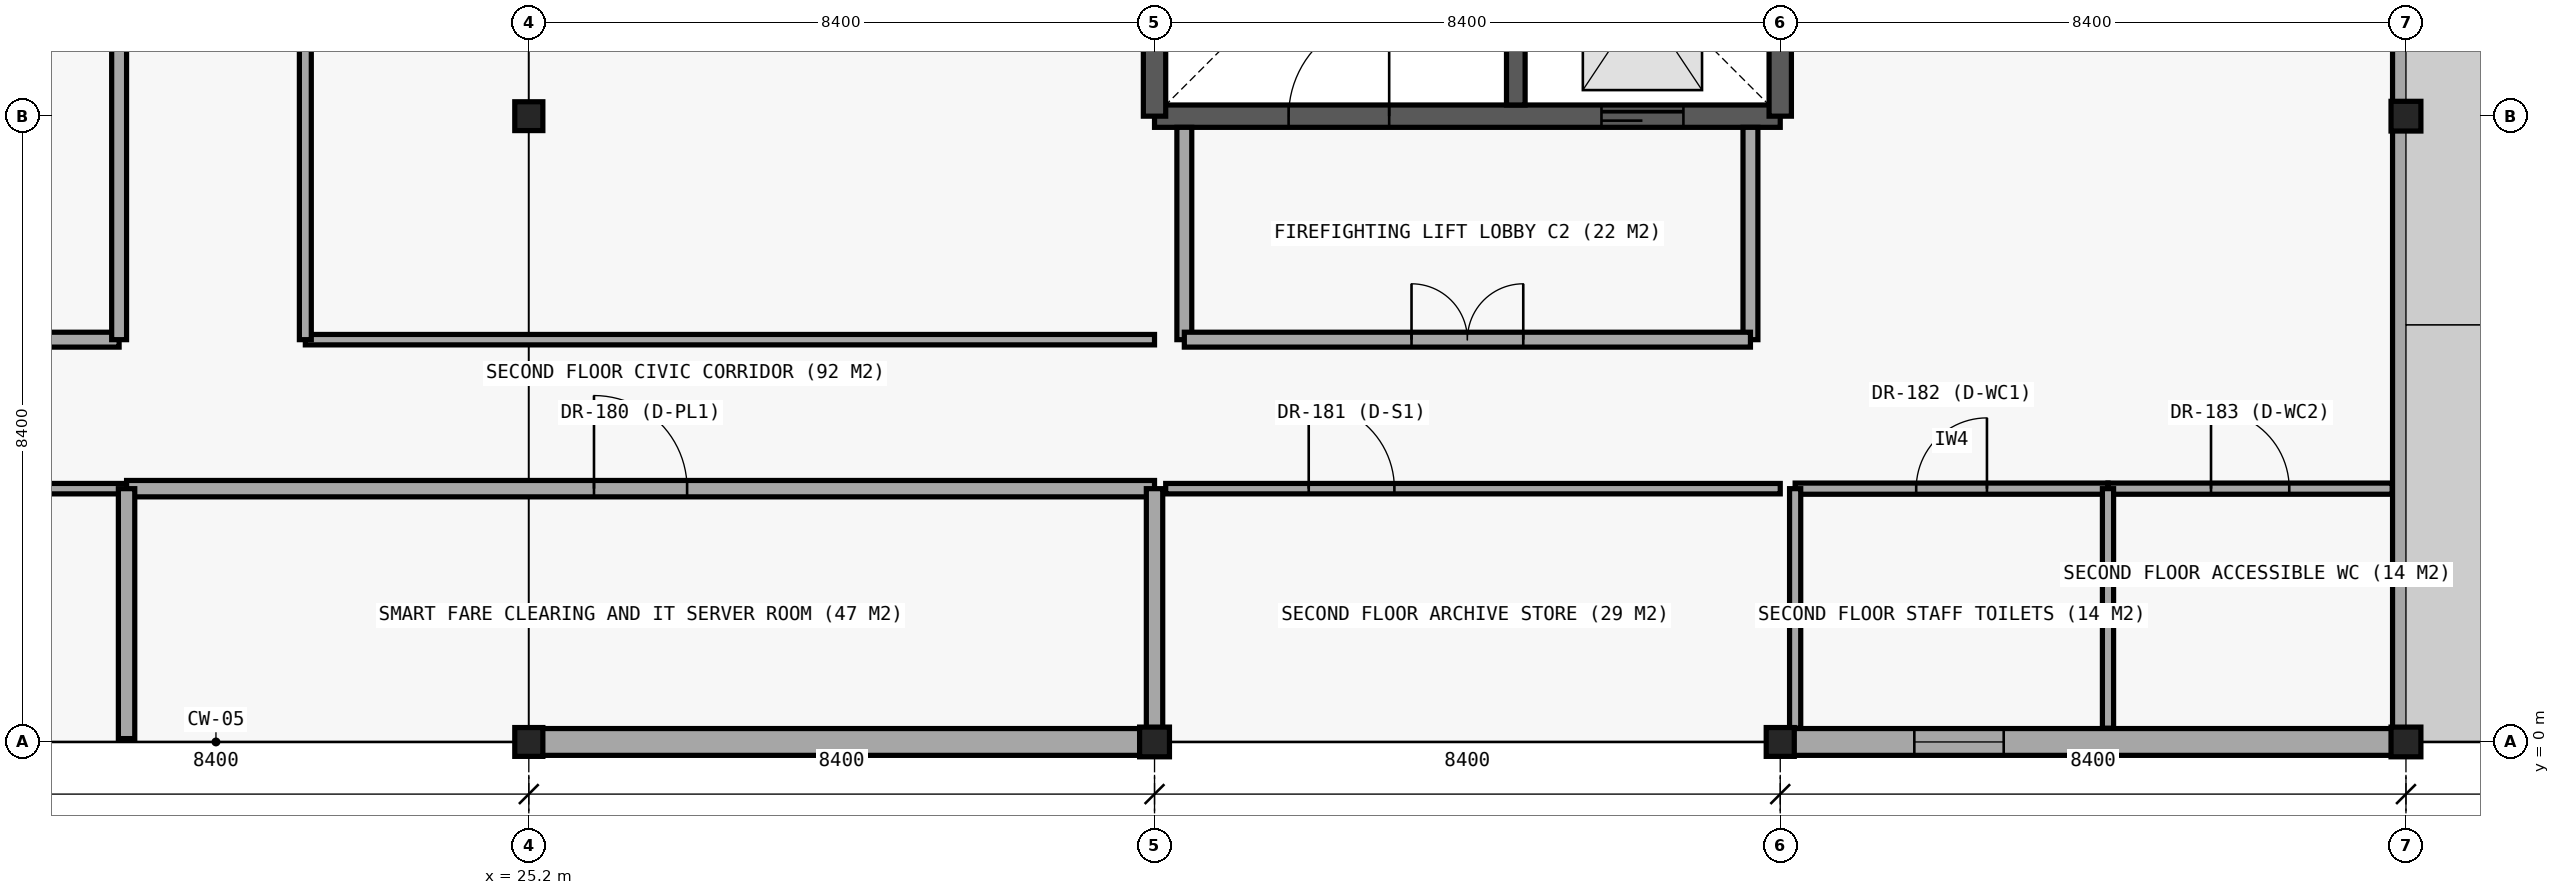
"""IFC4 building model, lengths in metres.
Left out: names, types, materials, properties, quantities, classifications, styles, units other than length and angle.
Written with IfcOpenShell. Run it as: python <this file> out.ifc"""

import sys

from ifc_helpers import new_model, si_unit, direction, frame, frame_2d, origin, origin_2d, place, context, subcontext, project, spatial, rectangle, i_section, extrude, element, fill, save


model = new_model("IFC4")
c1 = context("Model", 3, precision=1e-05, world=origin(), true_north=direction((0.0, 1.0)))
c2 = subcontext(c1, "Body", "Model", "MODEL_VIEW")
j1 = project(units=[si_unit("LENGTHUNIT", "METRE"), si_unit("PLANEANGLEUNIT", "RADIAN")], contexts=[c1])
p1 = place(None, origin())
s1 = spatial("IfcSite", under=j1, at=p1, CompositionType="ELEMENT")
p2 = place(p1, origin())
s2 = spatial("IfcBuilding", under=s1, at=p2, CompositionType="ELEMENT")
p3 = place(p2, frame((0.0, 0.0, 9.0)))
s3 = spatial("IfcBuildingStorey", under=s2, at=p3, CompositionType="ELEMENT", Elevation=9.0)
p4 = place(p3, frame((33.6, 8.4, 0.0), z_axis=(0.0, 0.0, 1.0), x_axis=(1.0, 0.0, 0.0)))
e1 = element("IfcWall", 1, at=p4, inside=s3, PredefinedType="SHEAR", context=c2, shape_type="SweptSolid", body=[
    extrude(rectangle(XDim=8.4, YDim=0.3, at=frame_2d((4.2, 0.0))), origin(), (0.0, 0.0, 1.0), 4.2),
])
p5 = place(p4, frame((1.8, 0.0, 0.0)))
e2 = element("IfcOpeningElement", 2, at=p5, cuts=e1, PredefinedType="OPENING", context=c2, shape_type="SweptSolid", body=[
    extrude(rectangle(XDim=1.35, YDim=2.2, at=frame_2d((0.675, 1.1))), frame((0.0, 0.16, 0.0), z_axis=(0.0, -1.0, 0.0), x_axis=(1.0, 0.0, 0.0)), (0.0, 0.0, 1.0), 0.32),
])
p6 = place(p4, frame((6.0, 0.0, 0.0)))
e3 = element("IfcOpeningElement", 3, at=p6, cuts=e1, PredefinedType="OPENING", context=c2, shape_type="SweptSolid", body=[
    extrude(rectangle(XDim=1.1, YDim=2.2, at=frame_2d((0.55, 1.1))), frame((0.0, 0.16, 0.0), z_axis=(0.0, -1.0, 0.0), x_axis=(1.0, 0.0, 0.0)), (0.0, 0.0, 1.0), 0.32),
])
for number, where, z_axis, x_axis in (
    (4, (42.0, 8.4, 0.0), (0.0, 0.0, 1.0), (0.0, 1.0, 0.0)),
    (5, (33.6, 16.8, 0.0), (0.0, 0.0, 1.0), (0.0, -1.0, 0.0)),
):
    element("IfcWall", number, at=place(p3, frame(where, z_axis=z_axis, x_axis=x_axis)), inside=s3, PredefinedType="SHEAR", context=c2, shape_type="SweptSolid", body=[
        extrude(rectangle(XDim=8.4, YDim=0.3, at=frame_2d((4.2, 0.0))), origin(), (0.0, 0.0, 1.0), 4.2),
    ])
p7 = place(p3, frame((38.45, 8.55, 0.0), z_axis=(0.0, 0.0, 1.0), x_axis=(0.0, 1.0, 0.0)))
e6 = element("IfcWall", 6, at=p7, inside=s3, PredefinedType="SHEAR", context=c2, shape_type="SweptSolid", body=[
    extrude(rectangle(XDim=8.1, YDim=0.25, at=frame_2d((4.05, 0.0))), origin(), (0.0, 0.0, 1.0), 4.2),
])
for number, where, z_axis, x_axis in (
    (7, (25.2, 0.0, 0.0), (0.0, 0.0, 1.0), (1.0, 0.0, 0.0)),
    (8, (25.2, 8.4, 0.0), (0.0, 0.0, 1.0), (1.0, 0.0, 0.0)),
):
    element("IfcColumn", number, at=place(p3, frame(where, z_axis=z_axis, x_axis=x_axis)), inside=s3, PredefinedType="COLUMN", context=c2, shape_type="SweptSolid", body=[
        extrude(i_section(OverallWidth=0.377, OverallDepth=0.387, WebThickness=0.022, FlangeThickness=0.036, FilletRadius=0.015, at=origin_2d()), origin(), (0.0, 0.0, 1.0), 4.2),
    ])
p8 = place(p3, frame((33.6, 0.0, 0.0), z_axis=(0.0, 0.0, 1.0), x_axis=(1.0, 0.0, 0.0)))
e9 = element("IfcColumn", 9, at=p8, inside=s3, PredefinedType="COLUMN", context=c2, shape_type="SweptSolid", body=[
    extrude(i_section(OverallWidth=0.401, OverallDepth=0.399, WebThickness=0.025, FlangeThickness=0.04, FilletRadius=0.015, at=origin_2d()), origin(), (0.0, 0.0, 1.0), 4.2),
])
p9 = place(p3, frame((42.0, 0.0, 0.0), z_axis=(0.0, 0.0, 1.0), x_axis=(1.0, 0.0, 0.0)))
e10 = element("IfcColumn", 10, at=p9, inside=s3, PredefinedType="COLUMN", context=c2, shape_type="SweptSolid", body=[
    extrude(i_section(OverallWidth=0.377, OverallDepth=0.387, WebThickness=0.022, FlangeThickness=0.036, FilletRadius=0.015, at=origin_2d()), origin(), (0.0, 0.0, 1.0), 4.2),
])
for number, where, z_axis, x_axis in (
    (11, (50.4, 0.0, 0.0), (0.0, 0.0, 1.0), (1.0, 0.0, 0.0)),
    (12, (50.4, 8.4, 0.0), (0.0, 0.0, 1.0), (1.0, 0.0, 0.0)),
):
    element("IfcColumn", number, at=place(p3, frame(where, z_axis=z_axis, x_axis=x_axis)), inside=s3, PredefinedType="COLUMN", context=c2, shape_type="SweptSolid", body=[
        extrude(i_section(OverallWidth=0.401, OverallDepth=0.399, WebThickness=0.025, FlangeThickness=0.04, FilletRadius=0.015, at=origin_2d()), origin(), (0.0, 0.0, 1.0), 4.2),
    ])
p10 = place(p3, frame((25.2, 0.0, 0.0), z_axis=(0.0, 0.0, 1.0), x_axis=(1.0, 0.0, 0.0)))
e13 = element("IfcWall", 13, at=p10, inside=s3, PredefinedType="STANDARD", context=c2, shape_type="SweptSolid", body=[
    extrude(rectangle(XDim=8.4, YDim=0.36, at=frame_2d((4.2, 0.0))), origin(), (0.0, 0.0, 1.0), 3.62),
])
p11 = place(p3, frame((42.0, 0.0, 0.0), z_axis=(0.0, 0.0, 1.0), x_axis=(1.0, 0.0, 0.0)))
e14 = element("IfcWall", 14, at=p11, inside=s3, PredefinedType="STANDARD", context=c2, shape_type="SweptSolid", body=[
    extrude(rectangle(XDim=8.4, YDim=0.36, at=frame_2d((4.2, 0.0))), origin(), (0.0, 0.0, 1.0), 3.62),
])
p12 = place(p11, frame((1.8, 0.0, 0.85)))
e15 = element("IfcOpeningElement", 15, at=p12, cuts=e14, PredefinedType="OPENING", context=c2, shape_type="SweptSolid", body=[
    extrude(rectangle(XDim=1.2, YDim=2.4, at=frame_2d((0.6, 1.2))), frame((0.0, 0.19, 0.0), z_axis=(0.0, -1.0, 0.0), x_axis=(1.0, 0.0, 0.0)), (0.0, 0.0, 1.0), 0.38),
])
p13 = place(p3, frame((50.4, 0.0, 0.0), z_axis=(0.0, 0.0, 1.0), x_axis=(0.0, 1.0, 0.0)))
e16 = element("IfcWall", 16, at=p13, inside=s3, PredefinedType="STANDARD", context=c2, shape_type="SweptSolid", body=[
    extrude(rectangle(XDim=8.4, YDim=0.36, at=frame_2d((4.2, 0.0))), origin(), (0.0, 0.0, 1.0), 3.62),
])
p14 = place(p3, frame((50.4, 8.4, 0.0), z_axis=(0.0, 0.0, 1.0), x_axis=(0.0, 1.0, 0.0)))
e17 = element("IfcWall", 17, at=p14, inside=s3, PredefinedType="STANDARD", context=c2, shape_type="SweptSolid", body=[
    extrude(rectangle(XDim=8.4, YDim=0.36, at=frame_2d((4.2, 0.0))), origin(), (0.0, 0.0, 1.0), 3.62),
])
p15 = place(p3, frame((8.8, 5.4, 0.0), z_axis=(0.0, 0.0, 1.0), x_axis=(1.0, 0.0, 0.0)))
e18 = element("IfcWall", 18, at=p15, inside=s3, PredefinedType="PARTITIONING", context=c2, shape_type="SweptSolid", body=[
    extrude(rectangle(XDim=10.9, YDim=0.2, at=frame_2d((5.45, 0.0))), origin(), (0.0, 0.0, 1.0), 3.52),
])
p16 = place(p15, frame((3.2, 0.0, 0.0)))
e19 = element("IfcOpeningElement", 19, at=p16, cuts=e18, PredefinedType="OPENING", context=c2, shape_type="SweptSolid", body=[
    extrude(rectangle(XDim=1.5, YDim=2.2, at=frame_2d((0.75, 1.1))), frame((0.0, 0.11, 0.0), z_axis=(0.0, -1.0, 0.0), x_axis=(1.0, 0.0, 0.0)), (0.0, 0.0, 1.0), 0.22),
])
p17 = place(p3, frame((19.7, 5.4, 0.0), z_axis=(0.0, 0.0, 1.0), x_axis=(0.0, 1.0, 0.0)))
e20 = element("IfcWall", 20, at=p17, inside=s3, PredefinedType="PARTITIONING", context=c2, shape_type="SweptSolid", body=[
    extrude(rectangle(XDim=9.6, YDim=0.2, at=frame_2d((4.8, 0.0))), origin(), (0.0, 0.0, 1.0), 3.52),
])
for number, where, z_axis, x_axis in (
    (21, (34.0, 5.4, 0.0), (0.0, 0.0, 1.0), (0.0, 1.0, 0.0)),
    (22, (41.6, 5.4, 0.0), (0.0, 0.0, 1.0), (0.0, 1.0, 0.0)),
):
    element("IfcWall", number, at=place(p3, frame(where, z_axis=z_axis, x_axis=x_axis)), inside=s3, PredefinedType="PARTITIONING", context=c2, shape_type="SweptSolid", body=[
        extrude(rectangle(XDim=2.85, YDim=0.2, at=frame_2d((1.425, 0.0))), origin(), (0.0, 0.0, 1.0), 3.49),
    ])
p18 = place(p3, frame((34.0, 5.4, 0.0), z_axis=(0.0, 0.0, 1.0), x_axis=(1.0, 0.0, 0.0)))
e23 = element("IfcWall", 23, at=p18, inside=s3, PredefinedType="PARTITIONING", context=c2, shape_type="SweptSolid", body=[
    extrude(rectangle(XDim=7.6, YDim=0.2, at=frame_2d((3.8, 0.0))), origin(), (0.0, 0.0, 1.0), 3.52),
])
p19 = place(p18, frame((3.05, 0.0, 0.0)))
e24 = element("IfcOpeningElement", 24, at=p19, cuts=e23, PredefinedType="OPENING", context=c2, shape_type="SweptSolid", body=[
    extrude(rectangle(XDim=1.5, YDim=2.2, at=frame_2d((0.75, 1.1))), frame((0.0, 0.11, 0.0), z_axis=(0.0, -1.0, 0.0), x_axis=(1.0, 0.0, 0.0)), (0.0, 0.0, 1.0), 0.22),
])
p20 = place(p3, frame((8.55, 3.4, 0.0), z_axis=(0.0, 0.0, 1.0), x_axis=(1.0, 0.0, 0.0)))
e25 = element("IfcWall", 25, at=p20, inside=s3, PredefinedType="PARTITIONING", context=c2, shape_type="SweptSolid", body=[
    extrude(rectangle(XDim=11.25, YDim=0.14, at=frame_2d((5.625, 0.0))), origin(), (0.0, 0.0, 1.0), 3.5),
])
p21 = place(p20, frame((1.92, 0.0, 0.0)))
e26 = element("IfcOpeningElement", 26, at=p21, cuts=e25, PredefinedType="OPENING", context=c2, shape_type="SweptSolid", body=[
    extrude(rectangle(XDim=1.0, YDim=2.15, at=frame_2d((0.5, 1.075))), frame((0.0, 0.08, 0.0), z_axis=(0.0, -1.0, 0.0), x_axis=(1.0, 0.0, 0.0)), (0.0, 0.0, 1.0), 0.16),
])
p22 = place(p3, frame((19.8, 3.4, 0.0), z_axis=(0.0, 0.0, 1.0), x_axis=(1.0, 0.0, 0.0)))
e27 = element("IfcWall", 27, at=p22, inside=s3, PredefinedType="PARTITIONING", context=c2, shape_type="SweptSolid", body=[
    extrude(rectangle(XDim=13.8, YDim=0.22, at=frame_2d((6.9, 0.0))), origin(), (0.0, 0.0, 1.0), 3.5),
])
p23 = place(p22, frame((6.275, 0.0, 0.0)))
e28 = element("IfcOpeningElement", 28, at=p23, cuts=e27, PredefinedType="OPENING", context=c2, shape_type="SweptSolid", body=[
    extrude(rectangle(XDim=1.25, YDim=2.2, at=frame_2d((0.625, 1.1))), frame((0.0, 0.12, 0.0), z_axis=(0.0, -1.0, 0.0), x_axis=(1.0, 0.0, 0.0)), (0.0, 0.0, 1.0), 0.24),
])
p24 = place(p3, frame((33.75, 3.4, 0.0), z_axis=(0.0, 0.0, 1.0), x_axis=(1.0, 0.0, 0.0)))
e29 = element("IfcWall", 29, at=p24, inside=s3, PredefinedType="PARTITIONING", context=c2, shape_type="SweptSolid", body=[
    extrude(rectangle(XDim=8.25, YDim=0.14, at=frame_2d((4.125, 0.0))), origin(), (0.0, 0.0, 1.0), 3.5),
])
p25 = place(p24, frame((1.92, 0.0, 0.0)))
e30 = element("IfcOpeningElement", 30, at=p25, cuts=e29, PredefinedType="OPENING", context=c2, shape_type="SweptSolid", body=[
    extrude(rectangle(XDim=1.15, YDim=2.15, at=frame_2d((0.575, 1.075))), frame((0.0, 0.08, 0.0), z_axis=(0.0, -1.0, 0.0), x_axis=(1.0, 0.0, 0.0)), (0.0, 0.0, 1.0), 0.16),
])
p26 = place(p3, frame((42.2, 3.4, 0.0), z_axis=(0.0, 0.0, 1.0), x_axis=(1.0, 0.0, 0.0)))
e31 = element("IfcWall", 31, at=p26, inside=s3, PredefinedType="PARTITIONING", context=c2, shape_type="SweptSolid", body=[
    extrude(rectangle(XDim=4.2, YDim=0.15, at=frame_2d((2.1, 0.0))), origin(), (0.0, 0.0, 1.0), 3.5),
])
p27 = place(p26, frame((1.625, 0.0, 0.0)))
e32 = element("IfcOpeningElement", 32, at=p27, cuts=e31, PredefinedType="OPENING", context=c2, shape_type="SweptSolid", body=[
    extrude(rectangle(XDim=0.95, YDim=2.1, at=frame_2d((0.475, 1.05))), frame((0.0, 0.085, 0.0), z_axis=(0.0, -1.0, 0.0), x_axis=(1.0, 0.0, 0.0)), (0.0, 0.0, 1.0), 0.17),
])
p28 = place(p3, frame((46.4, 3.4, 0.0), z_axis=(0.0, 0.0, 1.0), x_axis=(1.0, 0.0, 0.0)))
e33 = element("IfcWall", 33, at=p28, inside=s3, PredefinedType="PARTITIONING", context=c2, shape_type="SweptSolid", body=[
    extrude(rectangle(XDim=3.815, YDim=0.15, at=frame_2d((1.908, 0.0))), origin(), (0.0, 0.0, 1.0), 3.5),
])
p29 = place(p28, frame((1.383, 0.0, 0.0)))
e34 = element("IfcOpeningElement", 34, at=p29, cuts=e33, PredefinedType="OPENING", context=c2, shape_type="SweptSolid", body=[
    extrude(rectangle(XDim=1.05, YDim=2.15, at=frame_2d((0.525, 1.075))), frame((0.0, 0.085, 0.0), z_axis=(0.0, -1.0, 0.0), x_axis=(1.0, 0.0, 0.0)), (0.0, 0.0, 1.0), 0.17),
])
p30 = place(p3, frame((22.2, 5.4, 0.0), z_axis=(0.0, 0.0, 1.0), x_axis=(1.0, 0.0, 0.0)))
e35 = element("IfcWall", 35, at=p30, inside=s3, PredefinedType="PARTITIONING", context=c2, shape_type="SweptSolid", body=[
    extrude(rectangle(XDim=11.4, YDim=0.14, at=frame_2d((5.7, 0.0))), origin(), (0.0, 0.0, 1.0), 3.5),
])
p31 = place(p3, frame((19.8, 0.045, 0.0), z_axis=(0.0, 0.0, 1.0), x_axis=(0.0, 1.0, 0.0)))
e36 = element("IfcWall", 36, at=p31, inside=s3, PredefinedType="PARTITIONING", context=c2, shape_type="SweptSolid", body=[
    extrude(rectangle(XDim=3.355, YDim=0.22, at=frame_2d((1.677, 0.0))), origin(), (0.0, 0.0, 1.0), 3.5),
])
p32 = place(p3, frame((22.2, 5.4, 0.0), z_axis=(0.0, 0.0, 1.0), x_axis=(0.0, 1.0, 0.0)))
e37 = element("IfcWall", 37, at=p32, inside=s3, PredefinedType="PARTITIONING", context=c2, shape_type="SweptSolid", body=[
    extrude(rectangle(XDim=16.6, YDim=0.16, at=frame_2d((8.3, 0.0))), origin(), (0.0, 0.0, 1.0), 3.5),
])
p33 = place(p32, frame((13.12, 0.0, 0.0)))
e38 = element("IfcOpeningElement", 38, at=p33, cuts=e37, PredefinedType="OPENING", context=c2, shape_type="SweptSolid", body=[
    extrude(rectangle(XDim=1.0, YDim=2.15, at=frame_2d((0.5, 1.075))), frame((0.0, 0.09, 0.0), z_axis=(0.0, -1.0, 0.0), x_axis=(1.0, 0.0, 0.0)), (0.0, 0.0, 1.0), 0.18),
])
p34 = place(p3, frame((33.6, 0.185, 0.0), z_axis=(0.0, 0.0, 1.0), x_axis=(0.0, 1.0, 0.0)))
e39 = element("IfcWall", 39, at=p34, inside=s3, PredefinedType="PARTITIONING", context=c2, shape_type="SweptSolid", body=[
    extrude(rectangle(XDim=3.215, YDim=0.22, at=frame_2d((1.607, 0.0))), origin(), (0.0, 0.0, 1.0), 3.49),
])
p35 = place(p3, frame((42.2, 0.185, 0.0), z_axis=(0.0, 0.0, 1.0), x_axis=(0.0, 1.0, 0.0)))
e40 = element("IfcWall", 40, at=p35, inside=s3, PredefinedType="PARTITIONING", context=c2, shape_type="SweptSolid", body=[
    extrude(rectangle(XDim=3.215, YDim=0.15, at=frame_2d((1.607, 0.0))), origin(), (0.0, 0.0, 1.0), 3.49),
])
p36 = place(p3, frame((46.4, 0.185, 0.0), z_axis=(0.0, 0.0, 1.0), x_axis=(0.0, 1.0, 0.0)))
e41 = element("IfcWall", 41, at=p36, inside=s3, PredefinedType="PARTITIONING", context=c2, shape_type="SweptSolid", body=[
    extrude(rectangle(XDim=3.215, YDim=0.15, at=frame_2d((1.607, 0.0))), origin(), (0.0, 0.0, 1.0), 3.5),
])
p37 = place(p12, origin())
e42 = element("IfcWindow", 42, at=p37, inside=s3, PartitioningType="SINGLE_PANEL", PredefinedType="WINDOW", context=c2, shape_type="SweptSolid", body=[
    extrude(rectangle(XDim=1.2, YDim=2.4, at=frame_2d((0.6, 1.2))), frame((0.0, 0.03, 0.0), z_axis=(0.0, -1.0, 0.0), x_axis=(1.0, 0.0, 0.0)), (0.0, 0.0, 1.0), 0.06),
])
fill(e15, e42)
p38 = place(p5, origin())
e43 = element("IfcDoor", 43, at=p38, inside=s3, OperationType="SINGLE_SWING_RIGHT", PredefinedType="DOOR", context=c2, shape_type="SweptSolid", body=[
    extrude(rectangle(XDim=1.35, YDim=2.2, at=frame_2d((0.675, 1.1))), frame((0.0, 0.025, 0.0), z_axis=(0.0, -1.0, 0.0), x_axis=(1.0, 0.0, 0.0)), (0.0, 0.0, 1.0), 0.05),
])
fill(e2, e43)
p39 = place(p6, origin())
e44 = element("IfcDoor", 44, at=p39, inside=s3, OperationType="SLIDING_TO_LEFT", PredefinedType="DOOR", context=c2, shape_type="SweptSolid", body=[
    extrude(rectangle(XDim=1.1, YDim=2.2, at=frame_2d((0.55, 1.1))), frame((0.0, 0.025, 0.0), z_axis=(0.0, -1.0, 0.0), x_axis=(1.0, 0.0, 0.0)), (0.0, 0.0, 1.0), 0.05),
])
fill(e3, e44)
p40 = place(p19, origin())
e45 = element("IfcDoor", 45, at=p40, inside=s3, OperationType="DOUBLE_DOOR_SINGLE_SWING", PredefinedType="DOOR", context=c2, shape_type="SweptSolid", body=[
    extrude(rectangle(XDim=1.5, YDim=2.2, at=frame_2d((0.75, 1.1))), frame((0.0, 0.025, 0.0), z_axis=(0.0, -1.0, 0.0), x_axis=(1.0, 0.0, 0.0)), (0.0, 0.0, 1.0), 0.05),
])
fill(e24, e45)
p41 = place(p23, origin())
e46 = element("IfcDoor", 46, at=p41, inside=s3, OperationType="SINGLE_SWING_LEFT", PredefinedType="DOOR", context=c2, shape_type="SweptSolid", body=[
    extrude(rectangle(XDim=1.25, YDim=2.2, at=frame_2d((0.625, 1.1))), frame((0.0, 0.025, 0.0), z_axis=(0.0, -1.0, 0.0), x_axis=(1.0, 0.0, 0.0)), (0.0, 0.0, 1.0), 0.05),
])
fill(e28, e46)
p42 = place(p25, origin())
e47 = element("IfcDoor", 47, at=p42, inside=s3, OperationType="SINGLE_SWING_LEFT", PredefinedType="DOOR", context=c2, shape_type="SweptSolid", body=[
    extrude(rectangle(XDim=1.15, YDim=2.15, at=frame_2d((0.575, 1.075))), frame((0.0, 0.025, 0.0), z_axis=(0.0, -1.0, 0.0), x_axis=(1.0, 0.0, 0.0)), (0.0, 0.0, 1.0), 0.05),
])
fill(e30, e47)
p43 = place(p27, origin())
e48 = element("IfcDoor", 48, at=p43, inside=s3, OperationType="SINGLE_SWING_RIGHT", PredefinedType="DOOR", context=c2, shape_type="SweptSolid", body=[
    extrude(rectangle(XDim=0.95, YDim=2.1, at=frame_2d((0.475, 1.05))), frame((0.0, 0.025, 0.0), z_axis=(0.0, -1.0, 0.0), x_axis=(1.0, 0.0, 0.0)), (0.0, 0.0, 1.0), 0.05),
])
fill(e32, e48)
p44 = place(p29, origin())
e49 = element("IfcDoor", 49, at=p44, inside=s3, OperationType="SINGLE_SWING_LEFT", PredefinedType="DOOR", context=c2, shape_type="SweptSolid", body=[
    extrude(rectangle(XDim=1.05, YDim=2.15, at=frame_2d((0.525, 1.075))), frame((0.0, 0.025, 0.0), z_axis=(0.0, -1.0, 0.0), x_axis=(1.0, 0.0, 0.0)), (0.0, 0.0, 1.0), 0.05),
])
fill(e34, e49)
save(model, sys.argv[1])
